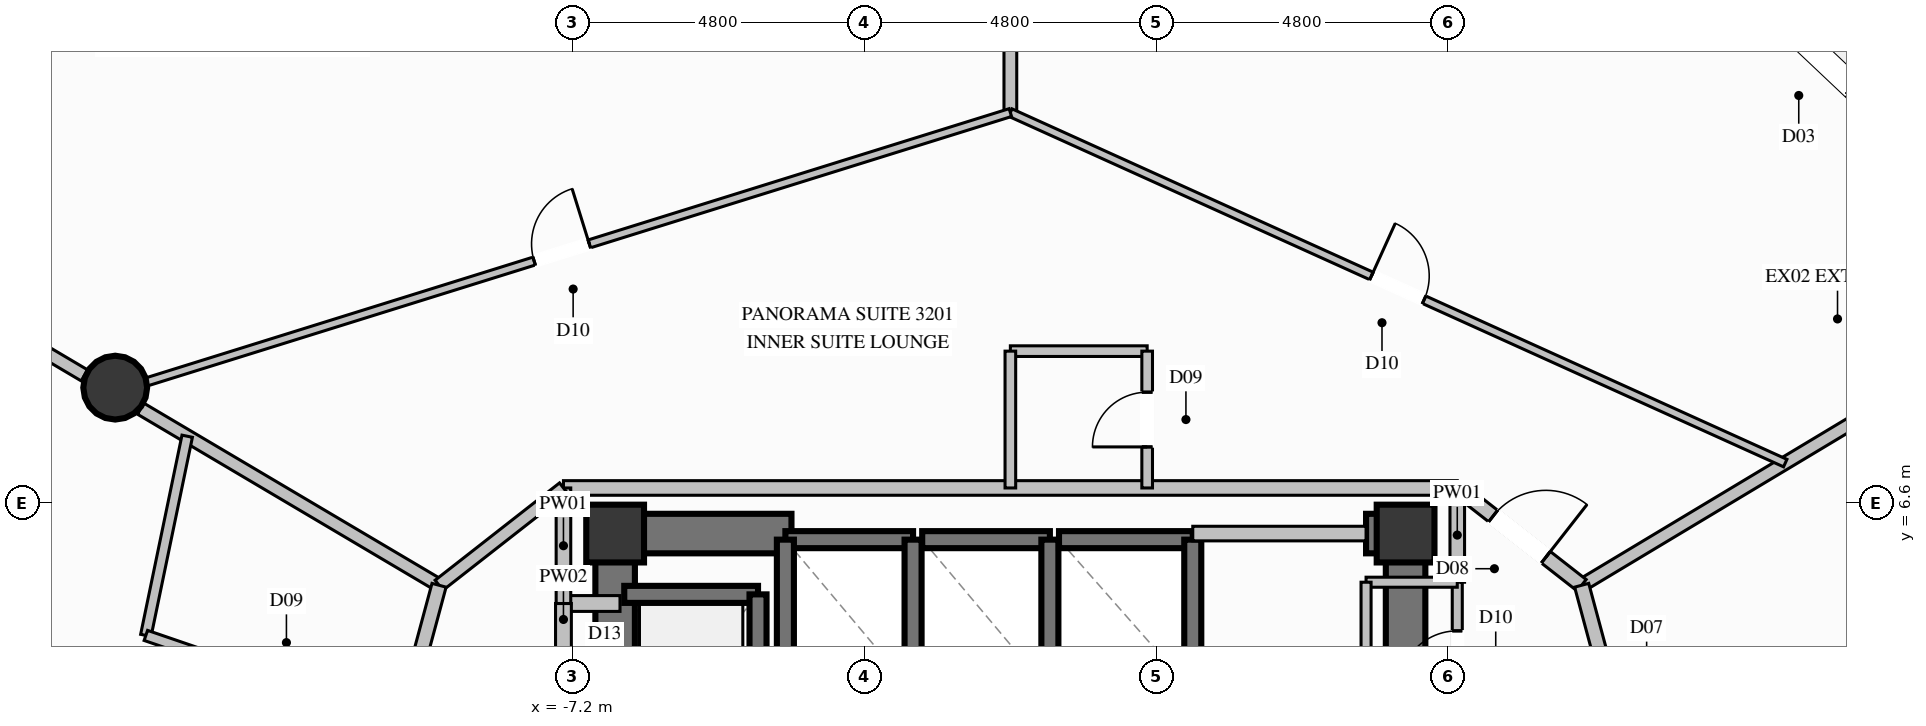
"""IFC4 building model, lengths in metres.
Left out: names, types, materials, properties, quantities, classifications, styles, units other than length and angle.
Written with IfcOpenShell. Run it as: python <this file> out.ifc"""

import sys

from ifc_helpers import new_model, si_unit, direction, frame, frame_2d, origin, origin_2d, place, context, subcontext, project, spatial, rectangle, circle, extrude, element, fill, save


model = new_model("IFC4")
c1 = context("Model", 3, precision=1e-05, world=origin(), true_north=direction((0.0, 1.0)))
c2 = subcontext(c1, "Body", "Model", "MODEL_VIEW")
j1 = project(units=[si_unit("LENGTHUNIT", "METRE"), si_unit("PLANEANGLEUNIT", "RADIAN")], contexts=[c1])
p1 = place(None, origin())
s1 = spatial("IfcSite", under=j1, at=p1, CompositionType="ELEMENT")
p2 = place(p1, origin())
s2 = spatial("IfcBuilding", under=s1, at=p2, CompositionType="ELEMENT")
p3 = place(p2, frame((0.0, 0.0, 120.6)))
s3 = spatial("IfcBuildingStorey", under=s2, at=p3, CompositionType="ELEMENT", Elevation=120.6)
for number, where, z_axis, x_axis in (
    (1, (6.5, 6.1, 0.0), (0.0, 0.0, 1.0), (1.0, 0.0, 0.0)),
    (2, (-6.5, 6.1, 0.0), (0.0, 0.0, 1.0), (1.0, 0.0, 0.0)),
):
    element("IfcColumn", number, at=place(p3, frame(where, z_axis=z_axis, x_axis=x_axis)), inside=s3, PredefinedType="COLUMN", context=c2, shape_type="SweptSolid", body=[
        extrude(rectangle(XDim=0.95, YDim=0.95, at=origin_2d()), origin(), (0.0, 0.0, 1.0), 3.6),
    ])
p4 = place(p3, frame((-6.175, 6.1, 0.0), z_axis=(0.0, 0.0, 1.0), x_axis=(1.0, 0.0, 0.0)))
e3 = element("IfcWall", 3, at=p4, inside=s3, PredefinedType="SHEAR", context=c2, shape_type="SweptSolid", body=[
    extrude(rectangle(XDim=2.575, YDim=0.65, at=frame_2d((1.288, 0.0))), origin(), (0.0, 0.0, 1.0), 3.6),
])
p5 = place(p3, frame((5.85, 6.1, 0.0), z_axis=(0.0, 0.0, 1.0), x_axis=(1.0, 0.0, 0.0)))
e4 = element("IfcWall", 4, at=p5, inside=s3, PredefinedType="SHEAR", context=c2, shape_type="SweptSolid", body=[
    extrude(rectangle(XDim=0.325, YDim=0.65, at=frame_2d((0.163, 0.0))), origin(), (0.0, 0.0, 1.0), 3.6),
])
p6 = place(p3, frame((-6.5, 2.35, 0.0), z_axis=(0.0, 0.0, 1.0), x_axis=(0.0, 1.0, 0.0)))
e5 = element("IfcWall", 5, at=p6, inside=s3, PredefinedType="SHEAR", context=c2, shape_type="SweptSolid", body=[
    extrude(rectangle(XDim=4.075, YDim=0.65, at=frame_2d((2.038, 0.0))), origin(), (0.0, 0.0, 1.0), 3.6),
])
p7 = place(p3, frame((6.5, 3.35, 0.0), z_axis=(0.0, 0.0, 1.0), x_axis=(0.0, 1.0, 0.0)))
e6 = element("IfcWall", 6, at=p7, inside=s3, PredefinedType="SHEAR", context=c2, shape_type="SweptSolid", body=[
    extrude(rectangle(XDim=3.075, YDim=0.65, at=frame_2d((1.538, 0.0))), origin(), (0.0, 0.0, 1.0), 3.6),
])
p8 = place(p3, frame((-14.722, 8.5, 0.0), z_axis=(0.0, 0.0, 1.0), x_axis=(1.0, 0.0, 0.0)))
e7 = element("IfcColumn", 7, at=p8, inside=s3, PredefinedType="COLUMN", context=c2, shape_type="SweptSolid", body=[
    extrude(circle(Radius=0.525, at=origin_2d()), origin(), (0.0, 0.0, 1.0), 3.6),
])
p9 = place(p3, frame((10.707, 16.416, 0.0), z_axis=(0.0, 0.0, 1.0), x_axis=(0.726865331795, -0.686780015314, 0.0)))
e8 = element("IfcWall", 8, at=p9, inside=s3, PredefinedType="SOLIDWALL", context=c2, shape_type="SweptSolid", body=[
    extrude(rectangle(XDim=7.558, YDim=0.32, at=frame_2d((3.779, 0.0))), origin(), (0.0, 0.0, 1.0), 3.35),
])
p10 = place(p9, frame((5.069, 0.0, 0.35)))
e9 = element("IfcOpeningElement", 9, at=p10, cuts=e8, PredefinedType="OPENING", context=c2, shape_type="SweptSolid", body=[
    extrude(rectangle(XDim=1.8, YDim=2.6, at=frame_2d((0.9, 1.3))), frame((0.0, 0.17, 0.0), z_axis=(0.0, -1.0, 0.0), x_axis=(1.0, 0.0, 0.0)), (0.0, 0.0, 1.0), 0.34),
])
p11 = place(p9, frame((3.229, 0.0, 0.0)))
e10 = element("IfcOpeningElement", 10, at=p11, cuts=e8, PredefinedType="OPENING", context=c2, shape_type="SweptSolid", body=[
    extrude(rectangle(XDim=1.1, YDim=2.2, at=frame_2d((0.55, 1.1))), frame((0.0, 0.17, 0.0), z_axis=(0.0, -1.0, 0.0), x_axis=(1.0, 0.0, 0.0)), (0.0, 0.0, 1.0), 0.34),
])
p12 = place(p3, frame((-1.6, 6.0, 0.0), z_axis=(0.0, 0.0, 1.0), x_axis=(-1.0, 0.0, 0.0)))
e11 = element("IfcWall", 11, at=p12, inside=s3, PredefinedType="SOLIDWALL", context=c2, shape_type="SweptSolid", body=[
    extrude(rectangle(XDim=2.1, YDim=0.28, at=frame_2d((1.05, 0.0))), origin(), (0.0, 0.0, 1.0), 3.35),
])
for number, where, z_axis, x_axis in (
    (12, (-3.7, 6.0, 0.0), (0.0, 0.0, 1.0), (0.0, -1.0, 0.0)),
    (13, (-1.6, 3.5, 0.0), (0.0, 0.0, 1.0), (0.0, 1.0, 0.0)),
):
    element("IfcWall", number, at=place(p3, frame(where, z_axis=z_axis, x_axis=x_axis)), inside=s3, PredefinedType="SOLIDWALL", context=c2, shape_type="SweptSolid", body=[
        extrude(rectangle(XDim=2.5, YDim=0.28, at=frame_2d((1.25, 0.0))), origin(), (0.0, 0.0, 1.0), 3.35),
    ])
p13 = place(p3, frame((0.65, 6.0, 0.0), z_axis=(0.0, 0.0, 1.0), x_axis=(-1.0, 0.0, 0.0)))
e14 = element("IfcWall", 14, at=p13, inside=s3, PredefinedType="SOLIDWALL", context=c2, shape_type="SweptSolid", body=[
    extrude(rectangle(XDim=2.1, YDim=0.28, at=frame_2d((1.05, 0.0))), origin(), (0.0, 0.0, 1.0), 3.35),
])
p14 = place(p3, frame((0.65, 3.5, 0.0), z_axis=(0.0, 0.0, 1.0), x_axis=(0.0, 1.0, 0.0)))
e15 = element("IfcWall", 15, at=p14, inside=s3, PredefinedType="SOLIDWALL", context=c2, shape_type="SweptSolid", body=[
    extrude(rectangle(XDim=2.5, YDim=0.28, at=frame_2d((1.25, 0.0))), origin(), (0.0, 0.0, 1.0), 3.35),
])
p15 = place(p3, frame((3.0, 6.0, 0.0), z_axis=(0.0, 0.0, 1.0), x_axis=(-1.0, 0.0, 0.0)))
e16 = element("IfcWall", 16, at=p15, inside=s3, PredefinedType="SOLIDWALL", context=c2, shape_type="SweptSolid", body=[
    extrude(rectangle(XDim=2.2, YDim=0.28, at=frame_2d((1.1, 0.0))), origin(), (0.0, 0.0, 1.0), 3.35),
])
p16 = place(p3, frame((3.0, 3.5, 0.0), z_axis=(0.0, 0.0, 1.0), x_axis=(0.0, 1.0, 0.0)))
e17 = element("IfcWall", 17, at=p16, inside=s3, PredefinedType="SOLIDWALL", context=c2, shape_type="SweptSolid", body=[
    extrude(rectangle(XDim=2.5, YDim=0.28, at=frame_2d((1.25, 0.0))), origin(), (0.0, 0.0, 1.0), 3.35),
])
p17 = place(p3, frame((-4.15, 5.1, 0.0), z_axis=(0.0, 0.0, 1.0), x_axis=(-1.0, 0.0, 0.0)))
e18 = element("IfcWall", 18, at=p17, inside=s3, PredefinedType="SOLIDWALL", context=c2, shape_type="SweptSolid", body=[
    extrude(rectangle(XDim=2.2, YDim=0.28, at=frame_2d((1.1, 0.0))), origin(), (0.0, 0.0, 1.0), 3.35),
])
p18 = place(p3, frame((-4.15, 2.4, 0.0), z_axis=(0.0, 0.0, 1.0), x_axis=(0.0, 1.0, 0.0)))
e19 = element("IfcWall", 19, at=p18, inside=s3, PredefinedType="SOLIDWALL", context=c2, shape_type="SweptSolid", body=[
    extrude(rectangle(XDim=2.7, YDim=0.28, at=frame_2d((1.35, 0.0))), origin(), (0.0, 0.0, 1.0), 3.35),
])
p19 = place(p3, frame((-7.35, 4.95, 0.0), z_axis=(0.0, 0.0, 1.0), x_axis=(1.0, 0.0, 0.0)))
e20 = element("IfcWall", 20, at=p19, inside=s3, PredefinedType="PARTITIONING", context=c2, shape_type="SweptSolid", body=[
    extrude(rectangle(XDim=0.93, YDim=0.26, at=frame_2d((0.465, 0.0))), origin(), (0.0, 0.0, 1.0), 3.35),
])
p20 = place(p3, frame((-7.35, 2.55, 0.0), z_axis=(0.0, 0.0, 1.0), x_axis=(0.0, 1.0, 0.0)))
e21 = element("IfcWall", 21, at=p20, inside=s3, PredefinedType="PARTITIONING", context=c2, shape_type="SweptSolid", body=[
    extrude(rectangle(XDim=2.4, YDim=0.26, at=frame_2d((1.2, 0.0))), origin(), (0.0, 0.0, 1.0), 2.435),
])
p21 = place(p20, frame((0.775, 0.0, 0.0)))
e22 = element("IfcOpeningElement", 22, at=p21, cuts=e21, PredefinedType="OPENING", context=c2, shape_type="SweptSolid", body=[
    extrude(rectangle(XDim=0.85, YDim=2.05, at=frame_2d((0.425, 1.025))), frame((0.0, 0.14, 0.0), z_axis=(0.0, -1.0, 0.0), x_axis=(1.0, 0.0, 0.0)), (0.0, 0.0, 1.0), 0.28),
])
p22 = place(p3, frame((-7.35, 6.85, 0.0), z_axis=(0.0, 0.0, 1.0), x_axis=(1.0, 0.0, 0.0)))
e23 = element("IfcWall", 23, at=p22, inside=s3, PredefinedType="PARTITIONING", context=c2, shape_type="SweptSolid", body=[
    extrude(rectangle(XDim=14.7, YDim=0.24, at=frame_2d((7.35, 0.0))), origin(), (0.0, 0.0, 1.0), 2.435),
])
p23 = place(p3, frame((-7.35, 4.95, 0.0), z_axis=(0.0, 0.0, 1.0), x_axis=(0.0, 1.0, 0.0)))
e24 = element("IfcWall", 24, at=p23, inside=s3, PredefinedType="PARTITIONING", context=c2, shape_type="SweptSolid", body=[
    extrude(rectangle(XDim=1.9, YDim=0.24, at=frame_2d((0.95, 0.0))), origin(), (0.0, 0.0, 1.0), 2.435),
])
p24 = place(p3, frame((7.35, 5.3, 0.0), z_axis=(0.0, 0.0, 1.0), x_axis=(0.0, 1.0, 0.0)))
e25 = element("IfcWall", 25, at=p24, inside=s3, PredefinedType="PARTITIONING", context=c2, shape_type="SweptSolid", body=[
    extrude(rectangle(XDim=1.55, YDim=0.24, at=frame_2d((0.775, 0.0))), origin(), (0.0, 0.0, 1.0), 2.435),
])
p25 = place(p3, frame((3.0, 6.1, 0.0), z_axis=(0.0, 0.0, 1.0), x_axis=(1.0, 0.0, 0.0)))
e26 = element("IfcWall", 26, at=p25, inside=s3, PredefinedType="PARTITIONING", context=c2, shape_type="SweptSolid", body=[
    extrude(rectangle(XDim=2.85, YDim=0.24, at=frame_2d((1.425, 0.0))), origin(), (0.0, 0.0, 1.0), 2.435),
])
p26 = place(p3, frame((7.35, 2.75, 0.0), z_axis=(0.0, 0.0, 1.0), x_axis=(0.0, 1.0, 0.0)))
e27 = element("IfcWall", 27, at=p26, inside=s3, PredefinedType="PARTITIONING", context=c2, shape_type="SweptSolid", body=[
    extrude(rectangle(XDim=2.55, YDim=0.165, at=frame_2d((1.275, 0.0))), origin(), (0.0, 0.0, 1.0), 3.35),
])
p27 = place(p26, frame((0.8, 0.0, 0.0)))
e28 = element("IfcOpeningElement", 28, at=p27, cuts=e27, PredefinedType="OPENING", context=c2, shape_type="SweptSolid", body=[
    extrude(rectangle(XDim=0.95, YDim=2.1, at=frame_2d((0.475, 1.05))), frame((0.0, 0.093, 0.0), z_axis=(0.0, -1.0, 0.0), x_axis=(1.0, 0.0, 0.0)), (0.0, 0.0, 1.0), 0.185),
])
p28 = place(p3, frame((7.35, 5.3, 0.0), z_axis=(0.0, 0.0, 1.0), x_axis=(-1.0, 0.0, 0.0)))
e29 = element("IfcWall", 29, at=p28, inside=s3, PredefinedType="PARTITIONING", context=c2, shape_type="SweptSolid", body=[
    extrude(rectangle(XDim=1.5, YDim=0.165, at=frame_2d((0.75, 0.0))), origin(), (0.0, 0.0, 1.0), 2.435),
])
p29 = place(p3, frame((5.85, 5.3, 0.0), z_axis=(0.0, 0.0, 1.0), x_axis=(0.0, -1.0, 0.0)))
e30 = element("IfcWall", 30, at=p29, inside=s3, PredefinedType="PARTITIONING", context=c2, shape_type="SweptSolid", body=[
    extrude(rectangle(XDim=2.55, YDim=0.165, at=frame_2d((1.275, 0.0))), origin(), (0.0, 0.0, 1.0), 2.435),
])
p30 = place(p3, frame((9.396, 5.25, 0.0), z_axis=(0.0, 0.0, 1.0), x_axis=(0.857379456535, 0.514684823471, 0.0)))
e31 = element("IfcWall", 31, at=p30, inside=s3, PredefinedType="PARTITIONING", context=c2, shape_type="SweptSolid", body=[
    extrude(rectangle(XDim=5.697, YDim=0.21, at=frame_2d((2.848, 0.0))), origin(), (0.0, 0.0, 1.0), 2.719),
])
p31 = place(p3, frame((-9.396, 5.25, 0.0), z_axis=(0.0, 0.0, 1.0), x_axis=(-0.860613457584, 0.509258752134, 0.0)))
e32 = element("IfcWall", 32, at=p31, inside=s3, PredefinedType="PARTITIONING", context=c2, shape_type="SweptSolid", body=[
    extrude(rectangle(XDim=5.701, YDim=0.21, at=frame_2d((2.85, 0.0))), origin(), (0.0, 0.0, 1.0), 2.719),
])
p32 = place(p3, frame((-15.228, 8.701, 0.0), z_axis=(0.0, 0.0, 1.0), x_axis=(-0.860620773238, 0.509246388962, 0.0)))
e33 = element("IfcWall", 33, at=p32, inside=s3, PredefinedType="PARTITIONING", context=c2, shape_type="SweptSolid", body=[
    extrude(rectangle(XDim=7.38, YDim=0.21, at=frame_2d((3.69, 0.0))), origin(), (0.0, 0.0, 1.0), 3.35),
])
for number, where, z_axis, x_axis in (
    (34, (0.0, 9.1, 0.0), (0.0, 0.0, 1.0), (1.0, 0.0, 0.0)),
    (35, (0.0, 9.1, 0.0), (0.0, 0.0, 1.0), (0.0, -1.0, 0.0)),
):
    element("IfcWall", number, at=place(p3, frame(where, z_axis=z_axis, x_axis=x_axis)), inside=s3, PredefinedType="PLUMBINGWALL", context=c2, shape_type="SweptSolid", body=[
        extrude(rectangle(XDim=2.25, YDim=0.175, at=frame_2d((1.125, 0.0))), origin(), (0.0, 0.0, 1.0), 3.35),
    ])
p33 = place(p3, frame((2.25, 6.85, 0.0), z_axis=(0.0, 0.0, 1.0), x_axis=(0.0, 1.0, 0.0)))
e36 = element("IfcWall", 36, at=p33, inside=s3, PredefinedType="PLUMBINGWALL", context=c2, shape_type="SweptSolid", body=[
    extrude(rectangle(XDim=2.25, YDim=0.175, at=frame_2d((1.125, 0.0))), origin(), (0.0, 0.0, 1.0), 3.35),
])
p34 = place(p33, frame((0.675, 0.0, 0.0)))
e37 = element("IfcOpeningElement", 37, at=p34, cuts=e36, PredefinedType="OPENING", context=c2, shape_type="SweptSolid", body=[
    extrude(rectangle(XDim=0.9, YDim=2.1, at=frame_2d((0.45, 1.05))), frame((0.0, 0.098, 0.0), z_axis=(0.0, -1.0, 0.0), x_axis=(1.0, 0.0, 0.0)), (0.0, 0.0, 1.0), 0.195),
])
p35 = place(p3, frame((-9.396, 5.25, 0.0), z_axis=(0.0, 0.0, 1.0), x_axis=(0.7876993483, 0.6160598483, 0.0)))
e38 = element("IfcWall", 38, at=p35, inside=s3, PredefinedType="PARTITIONING", context=c2, shape_type="SweptSolid", body=[
    extrude(rectangle(XDim=2.597, YDim=0.21, at=frame_2d((1.299, 0.0))), origin(), (0.0, 0.0, 1.0), 3.35),
])
p36 = place(p3, frame((7.35, 6.85, 0.0), z_axis=(0.0, 0.0, 1.0), x_axis=(0.7876993483, -0.6160598483, 0.0)))
e39 = element("IfcWall", 39, at=p36, inside=s3, PredefinedType="PARTITIONING", context=c2, shape_type="SweptSolid", body=[
    extrude(rectangle(XDim=2.597, YDim=0.24, at=frame_2d((1.299, 0.0))), origin(), (0.0, 0.0, 1.0), 3.35),
])
p37 = place(p36, frame((0.749, 0.0, 0.0)))
e40 = element("IfcOpeningElement", 40, at=p37, cuts=e39, PredefinedType="OPENING", context=c2, shape_type="SweptSolid", body=[
    extrude(rectangle(XDim=1.1, YDim=2.3, at=frame_2d((0.55, 1.15))), frame((0.0, 0.13, 0.0), z_axis=(0.0, -1.0, 0.0), x_axis=(1.0, 0.0, 0.0)), (0.0, 0.0, 1.0), 0.26),
])
p38 = place(p3, frame((0.0, 13.023, 0.0), z_axis=(0.0, 0.0, 1.0), x_axis=(0.0, 1.0, 0.0)))
e41 = element("IfcWall", 41, at=p38, inside=s3, PredefinedType="PARTITIONING", context=c2, shape_type="SweptSolid", body=[
    extrude(rectangle(XDim=3.432, YDim=0.21, at=frame_2d((1.716, 0.0))), origin(), (0.0, 0.0, 1.0), 3.35),
])
p39 = place(p3, frame((0.0, 13.023, 0.0), z_axis=(0.0, 0.0, 1.0), x_axis=(0.911139602209, -0.412097834605, 0.0)))
e42 = element("IfcWall", 42, at=p39, inside=s3, PredefinedType="PARTITIONING", context=c2, shape_type="SweptSolid", body=[
    extrude(rectangle(XDim=13.987, YDim=0.135, at=frame_2d((6.993, 0.0))), origin(), (0.0, 0.0, 1.0), 3.35),
])
p40 = place(p39, frame((6.518, 0.0, 0.0)))
e43 = element("IfcOpeningElement", 43, at=p40, cuts=e42, PredefinedType="OPENING", context=c2, shape_type="SweptSolid", body=[
    extrude(rectangle(XDim=0.95, YDim=2.1, at=frame_2d((0.475, 1.05))), frame((0.0, 0.078, 0.0), z_axis=(0.0, -1.0, 0.0), x_axis=(1.0, 0.0, 0.0)), (0.0, 0.0, 1.0), 0.155),
])
p41 = place(p3, frame((-14.757, 8.422, 0.0), z_axis=(0.0, 0.0, 1.0), x_axis=(0.954677897028, 0.297640912722, 0.0)))
e44 = element("IfcWall", 44, at=p41, inside=s3, PredefinedType="PARTITIONING", context=c2, shape_type="SweptSolid", body=[
    extrude(rectangle(XDim=15.458, YDim=0.135, at=frame_2d((7.729, 0.0))), origin(), (0.0, 0.0, 1.0), 2.878),
])
p42 = place(p41, frame((7.254, 0.0, 0.0)))
e45 = element("IfcOpeningElement", 45, at=p42, cuts=e44, PredefinedType="OPENING", context=c2, shape_type="SweptSolid", body=[
    extrude(rectangle(XDim=0.95, YDim=2.1, at=frame_2d((0.475, 1.05))), frame((0.0, 0.078, 0.0), z_axis=(0.0, -1.0, 0.0), x_axis=(1.0, 0.0, 0.0)), (0.0, 0.0, 1.0), 0.155),
])
p43 = place(p3, frame((-9.396, 5.25, 0.0), z_axis=(0.0, 0.0, 1.0), x_axis=(-0.260152382661, -0.965567572879, 0.0)))
e46 = element("IfcWall", 46, at=p43, inside=s3, PredefinedType="PARTITIONING", context=c2, shape_type="SweptSolid", body=[
    extrude(rectangle(XDim=2.349, YDim=0.24, at=frame_2d((1.174, 0.0))), origin(), (0.0, 0.0, 1.0), 3.35),
])
p44 = place(p3, frame((-13.538, 7.701, 0.0), z_axis=(0.0, 0.0, 1.0), x_axis=(-0.203225696563, -0.979131919741, 0.0)))
e47 = element("IfcWall", 47, at=p44, inside=s3, PredefinedType="PLUMBINGWALL", context=c2, shape_type="SweptSolid", body=[
    extrude(rectangle(XDim=3.346, YDim=0.175, at=frame_2d((1.673, 0.0))), origin(), (0.0, 0.0, 1.0), 3.35),
])
p45 = place(p3, frame((-10.007, 2.982, 0.0), z_axis=(0.0, 0.0, 1.0), x_axis=(-0.945989686211, 0.3241967205, 0.0)))
e48 = element("IfcWall", 48, at=p45, inside=s3, PredefinedType="PLUMBINGWALL", context=c2, shape_type="SweptSolid", body=[
    extrude(rectangle(XDim=4.451, YDim=0.175, at=frame_2d((2.226, 0.0))), origin(), (0.0, 0.0, 1.0), 3.35),
])
p46 = place(p45, frame((1.776, 0.0, 0.0)))
e49 = element("IfcOpeningElement", 49, at=p46, cuts=e48, PredefinedType="OPENING", context=c2, shape_type="SweptSolid", body=[
    extrude(rectangle(XDim=0.9, YDim=2.1, at=frame_2d((0.45, 1.05))), frame((0.0, 0.098, 0.0), z_axis=(0.0, -1.0, 0.0), x_axis=(1.0, 0.0, 0.0)), (0.0, 0.0, 1.0), 0.195),
])
p47 = place(p3, frame((10.239, 2.118, 0.0), z_axis=(0.0, 0.0, 1.0), x_axis=(-0.259905989708, 0.965633924691, 0.0)))
e50 = element("IfcWall", 50, at=p47, inside=s3, PredefinedType="PARTITIONING", context=c2, shape_type="SweptSolid", body=[
    extrude(rectangle(XDim=3.244, YDim=0.24, at=frame_2d((1.622, 0.0))), origin(), (0.0, 0.0, 1.0), 3.35),
])
p48 = place(p47, frame((1.122, 0.0, 0.0)))
e51 = element("IfcOpeningElement", 51, at=p48, cuts=e50, PredefinedType="OPENING", context=c2, shape_type="SweptSolid", body=[
    extrude(rectangle(XDim=1.0, YDim=2.2, at=frame_2d((0.5, 1.1))), frame((0.0, 0.13, 0.0), z_axis=(0.0, -1.0, 0.0), x_axis=(1.0, 0.0, 0.0)), (0.0, 0.0, 1.0), 0.26),
])
p49 = place(p11, origin())
e52 = element("IfcDoor", 52, at=p49, inside=s3, OperationType="SINGLE_SWING_LEFT", PredefinedType="DOOR", context=c2, shape_type="SweptSolid", body=[
    extrude(rectangle(XDim=1.1, YDim=2.2, at=frame_2d((0.55, 1.1))), frame((0.0, 0.025, 0.0), z_axis=(0.0, -1.0, 0.0), x_axis=(1.0, 0.0, 0.0)), (0.0, 0.0, 1.0), 0.05),
])
fill(e10, e52)
p50 = place(p27, origin())
e53 = element("IfcDoor", 53, at=p50, inside=s3, OperationType="SINGLE_SWING_LEFT", PredefinedType="DOOR", context=c2, shape_type="SweptSolid", body=[
    extrude(rectangle(XDim=0.95, YDim=2.1, at=frame_2d((0.475, 1.05))), frame((0.0, 0.025, 0.0), z_axis=(0.0, -1.0, 0.0), x_axis=(1.0, 0.0, 0.0)), (0.0, 0.0, 1.0), 0.05),
])
fill(e28, e53)
p51 = place(p34, origin())
e54 = element("IfcDoor", 54, at=p51, inside=s3, OperationType="SINGLE_SWING_LEFT", PredefinedType="DOOR", context=c2, shape_type="SweptSolid", body=[
    extrude(rectangle(XDim=0.9, YDim=2.1, at=frame_2d((0.45, 1.05))), frame((0.0, 0.025, 0.0), z_axis=(0.0, -1.0, 0.0), x_axis=(1.0, 0.0, 0.0)), (0.0, 0.0, 1.0), 0.05),
])
fill(e37, e54)
p52 = place(p37, origin())
e55 = element("IfcDoor", 55, at=p52, inside=s3, OperationType="SINGLE_SWING_RIGHT", PredefinedType="DOOR", context=c2, shape_type="SweptSolid", body=[
    extrude(rectangle(XDim=1.1, YDim=2.3, at=frame_2d((0.55, 1.15))), frame((0.0, 0.025, 0.0), z_axis=(0.0, -1.0, 0.0), x_axis=(1.0, 0.0, 0.0)), (0.0, 0.0, 1.0), 0.05),
])
fill(e40, e55)
p53 = place(p40, origin())
e56 = element("IfcDoor", 56, at=p53, inside=s3, OperationType="SINGLE_SWING_LEFT", PredefinedType="DOOR", context=c2, shape_type="SweptSolid", body=[
    extrude(rectangle(XDim=0.95, YDim=2.1, at=frame_2d((0.475, 1.05))), frame((0.0, 0.025, 0.0), z_axis=(0.0, -1.0, 0.0), x_axis=(1.0, 0.0, 0.0)), (0.0, 0.0, 1.0), 0.05),
])
fill(e43, e56)
p54 = place(p42, origin())
e57 = element("IfcDoor", 57, at=p54, inside=s3, OperationType="SINGLE_SWING_RIGHT", PredefinedType="DOOR", context=c2, shape_type="SweptSolid", body=[
    extrude(rectangle(XDim=0.95, YDim=2.1, at=frame_2d((0.475, 1.05))), frame((0.0, 0.025, 0.0), z_axis=(0.0, -1.0, 0.0), x_axis=(1.0, 0.0, 0.0)), (0.0, 0.0, 1.0), 0.05),
])
fill(e45, e57)
save(model, sys.argv[1])
